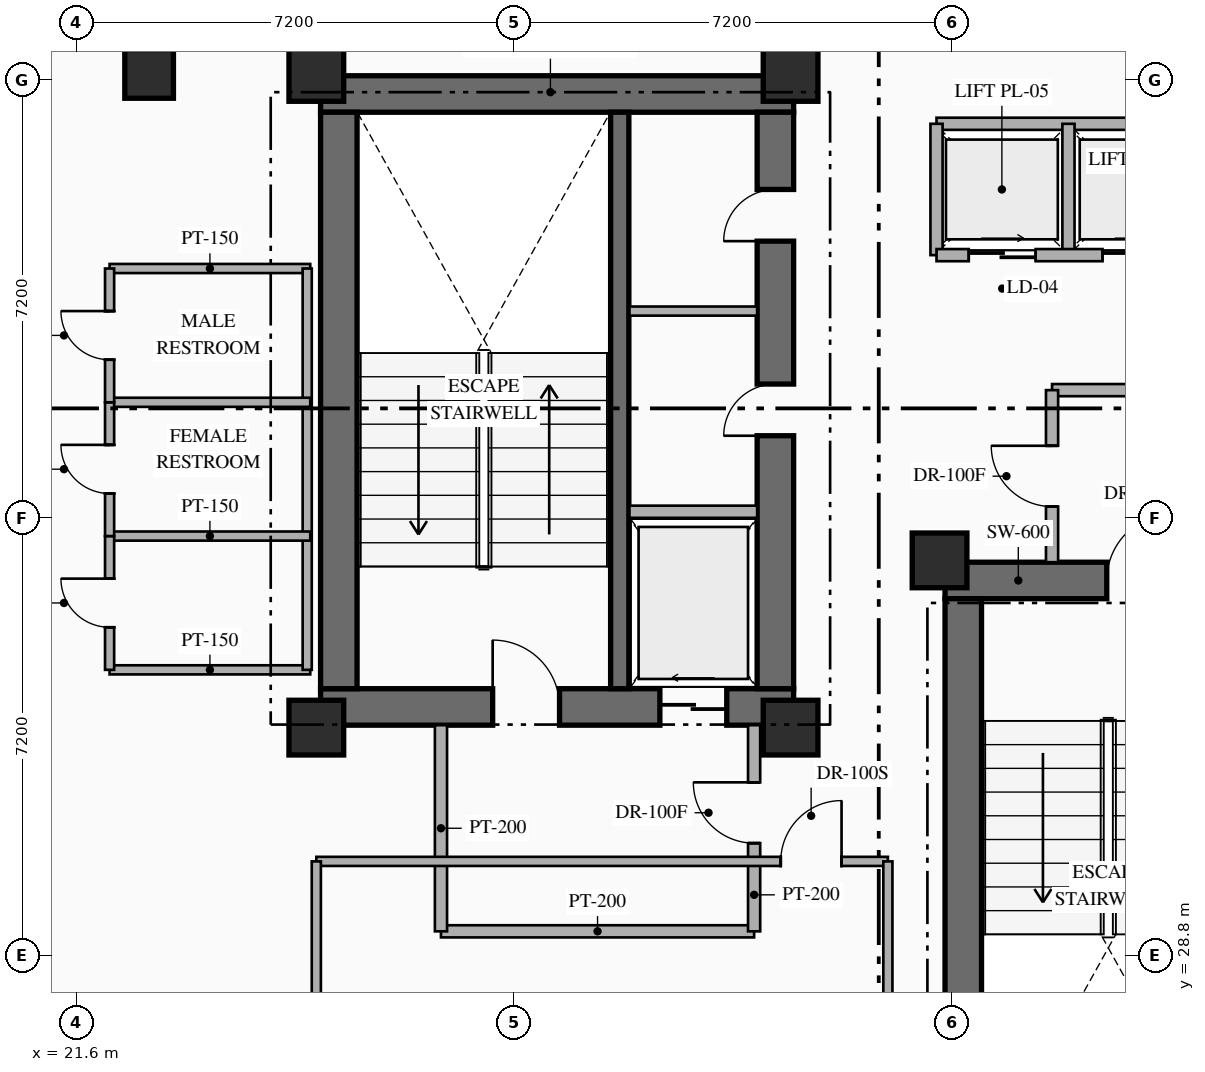
"""IFC4 building model, lengths in metres.
Left out: names, types, materials, properties, quantities, classifications, styles, units other than length and angle.
Written with IfcOpenShell. Run it as: python <this file> out.ifc"""

import sys

from ifc_helpers import new_model, si_unit, direction, frame, frame_2d, origin, origin_2d, place, context, subcontext, project, spatial, rectangle, hollow_rectangle, extrude, element, fill, save


model = new_model("IFC4")
c1 = context("Model", 3, precision=1e-05, world=origin(), true_north=direction((0.0, 1.0)))
c2 = subcontext(c1, "Body", "Model", "MODEL_VIEW")
j1 = project(units=[si_unit("LENGTHUNIT", "METRE"), si_unit("PLANEANGLEUNIT", "RADIAN")], contexts=[c1])
p1 = place(None, origin())
s1 = spatial("IfcSite", under=j1, at=p1, CompositionType="ELEMENT")
p2 = place(p1, origin())
s2 = spatial("IfcBuilding", under=s1, at=p2, CompositionType="ELEMENT")
p3 = place(p2, frame((0.0, 0.0, 134.85)))
s3 = spatial("IfcBuildingStorey", under=s2, at=p3, CompositionType="ELEMENT", Elevation=134.85)
p4 = place(p3, frame((25.62, 32.89, 0.0), z_axis=(0.0, 0.0, 1.0), x_axis=(1.0, 0.0, 0.0)))
e1 = element("IfcWall", 1, at=p4, inside=s3, PredefinedType="SHEAR", context=c2, shape_type="SweptSolid", body=[
    extrude(rectangle(XDim=7.78, YDim=0.6, at=frame_2d((3.89, 0.0))), origin(), (0.0, 0.0, 1.0), 3.6),
])
p5 = place(p4, frame((2.83, 0.0, 0.0)))
e2 = element("IfcOpeningElement", 2, at=p5, cuts=e1, PredefinedType="OPENING", context=c2, shape_type="SweptSolid", body=[
    extrude(rectangle(XDim=1.1, YDim=2.2, at=frame_2d((0.55, 1.1))), frame((0.0, 0.31, 0.0), z_axis=(0.0, -1.0, 0.0), x_axis=(1.0, 0.0, 0.0)), (0.0, 0.0, 1.0), 0.62),
])
p6 = place(p4, frame((5.58, 0.0, 0.0)))
e3 = element("IfcOpeningElement", 3, at=p6, cuts=e1, PredefinedType="OPENING", context=c2, shape_type="SweptSolid", body=[
    extrude(rectangle(XDim=1.1, YDim=2.15, at=frame_2d((0.55, 1.075))), frame((0.0, 0.31, 0.0), z_axis=(0.0, -1.0, 0.0), x_axis=(1.0, 0.0, 0.0)), (0.0, 0.0, 1.0), 0.62),
])
p7 = place(p3, frame((25.62, 42.97, 0.0), z_axis=(0.0, 0.0, 1.0), x_axis=(1.0, 0.0, 0.0)))
e4 = element("IfcWall", 4, at=p7, inside=s3, PredefinedType="SHEAR", context=c2, shape_type="SweptSolid", body=[
    extrude(rectangle(XDim=7.78, YDim=0.6, at=frame_2d((3.89, 0.0))), origin(), (0.0, 0.0, 1.0), 3.6),
])
p8 = place(p3, frame((25.92, 33.19, 0.0), z_axis=(0.0, 0.0, 1.0), x_axis=(0.0, 1.0, 0.0)))
e5 = element("IfcWall", 5, at=p8, inside=s3, PredefinedType="SHEAR", context=c2, shape_type="SweptSolid", body=[
    extrude(rectangle(XDim=9.48, YDim=0.6, at=frame_2d((4.74, 0.0))), origin(), (0.0, 0.0, 1.0), 3.6),
])
p9 = place(p3, frame((33.1, 33.19, 0.0), z_axis=(0.0, 0.0, 1.0), x_axis=(0.0, 1.0, 0.0)))
e6 = element("IfcWall", 6, at=p9, inside=s3, PredefinedType="SHEAR", context=c2, shape_type="SweptSolid", body=[
    extrude(rectangle(XDim=9.48, YDim=0.6, at=frame_2d((4.74, 0.0))), origin(), (0.0, 0.0, 1.0), 3.6),
])
p10 = place(p9, frame((4.16, 0.0, 0.0)))
e7 = element("IfcOpeningElement", 7, at=p10, cuts=e6, PredefinedType="OPENING", context=c2, shape_type="SweptSolid", body=[
    extrude(rectangle(XDim=0.85, YDim=2.08, at=frame_2d((0.425, 1.04))), frame((0.0, 0.31, 0.0), z_axis=(0.0, -1.0, 0.0), x_axis=(1.0, 0.0, 0.0)), (0.0, 0.0, 1.0), 0.62),
])
p11 = place(p9, frame((7.36, 0.0, 0.0)))
e8 = element("IfcOpeningElement", 8, at=p11, cuts=e6, PredefinedType="OPENING", context=c2, shape_type="SweptSolid", body=[
    extrude(rectangle(XDim=0.85, YDim=2.08, at=frame_2d((0.425, 1.04))), frame((0.0, 0.31, 0.0), z_axis=(0.0, -1.0, 0.0), x_axis=(1.0, 0.0, 0.0)), (0.0, 0.0, 1.0), 0.62),
])
p12 = place(p3, frame((30.54, 33.19, 0.0), z_axis=(0.0, 0.0, 1.0), x_axis=(0.0, 1.0, 0.0)))
e9 = element("IfcWall", 9, at=p12, inside=s3, PredefinedType="SHEAR", context=c2, shape_type="SweptSolid", body=[
    extrude(rectangle(XDim=9.48, YDim=0.3, at=frame_2d((4.74, 0.0))), origin(), (0.0, 0.0, 1.0), 3.6),
])
p13 = place(p3, frame((35.89, 34.97, 0.0), z_axis=(0.0, 0.0, 1.0), x_axis=(1.0, 0.0, 0.0)))
e10 = element("IfcWall", 10, at=p13, inside=s3, PredefinedType="SHEAR", context=c2, shape_type="SweptSolid", body=[
    extrude(rectangle(XDim=7.76, YDim=0.6, at=frame_2d((3.88, 0.0))), origin(), (0.0, 0.0, 1.0), 3.6),
])
p14 = place(p13, frame((2.66, 0.0, 0.0)))
e11 = element("IfcOpeningElement", 11, at=p14, cuts=e10, PredefinedType="OPENING", context=c2, shape_type="SweptSolid", body=[
    extrude(rectangle(XDim=1.1, YDim=2.2, at=frame_2d((0.55, 1.1))), frame((0.0, 0.31, 0.0), z_axis=(0.0, -1.0, 0.0), x_axis=(1.0, 0.0, 0.0)), (0.0, 0.0, 1.0), 0.62),
])
p15 = place(p13, frame((5.56, 0.0, 0.0)))
e12 = element("IfcOpeningElement", 12, at=p15, cuts=e10, PredefinedType="OPENING", context=c2, shape_type="SweptSolid", body=[
    extrude(rectangle(XDim=1.12, YDim=2.15, at=frame_2d((0.56, 1.075))), frame((0.0, 0.31, 0.0), z_axis=(0.0, -1.0, 0.0), x_axis=(1.0, 0.0, 0.0)), (0.0, 0.0, 1.0), 0.62),
])
p16 = place(p3, frame((36.19, 25.19, 0.0), z_axis=(0.0, 0.0, 1.0), x_axis=(0.0, 1.0, 0.0)))
e13 = element("IfcWall", 13, at=p16, inside=s3, PredefinedType="SHEAR", context=c2, shape_type="SweptSolid", body=[
    extrude(rectangle(XDim=9.48, YDim=0.6, at=frame_2d((4.74, 0.0))), origin(), (0.0, 0.0, 1.0), 3.6),
])
for number, where, z_axis, x_axis in (
    (14, (25.55, 32.55, 0.0), (0.0, 0.0, 1.0), (1.0, 0.0, 0.0)),
    (15, (33.35, 32.55, 0.0), (0.0, 0.0, 1.0), (1.0, 0.0, 0.0)),
    (16, (25.55, 43.3, 0.0), (0.0, 0.0, 1.0), (1.0, 0.0, 0.0)),
    (17, (33.35, 43.3, 0.0), (0.0, 0.0, 1.0), (1.0, 0.0, 0.0)),
    (18, (35.8, 35.3, 0.0), (0.0, 0.0, 1.0), (1.0, 0.0, 0.0)),
):
    element("IfcColumn", number, at=place(p3, frame(where, z_axis=z_axis, x_axis=x_axis)), inside=s3, PredefinedType="COLUMN", context=c2, shape_type="SweptSolid", body=[
        extrude(rectangle(XDim=0.9, YDim=0.9, at=origin_2d()), origin(), (0.0, 0.0, 1.0), 3.6),
    ])
p17 = place(p3, frame((22.8, 43.3, 0.0), z_axis=(0.0, 0.0, 1.0), x_axis=(1.0, 0.0, 0.0)))
e19 = element("IfcColumn", 19, at=p17, inside=s3, PredefinedType="COLUMN", context=c2, shape_type="SweptSolid", body=[
    extrude(hollow_rectangle(XDim=0.8, YDim=0.8, WallThickness=0.032, at=origin_2d()), origin(), (0.0, 0.0, 1.0), 3.6),
])
p18 = place(p3, frame((30.7, 36.1, 0.0), z_axis=(0.0, 0.0, 1.0), x_axis=(1.0, 0.0, 0.0)))
e20 = element("IfcWall", 20, at=p18, inside=s3, PredefinedType="STANDARD", context=c2, shape_type="SweptSolid", body=[
    extrude(rectangle(XDim=2.1, YDim=0.2, at=frame_2d((1.05, 0.0))), origin(), (0.0, 0.0, 1.0), 3.35),
])
p19 = place(p3, frame((30.7, 39.4, 0.0), z_axis=(0.0, 0.0, 1.0), x_axis=(1.0, 0.0, 0.0)))
e21 = element("IfcWall", 21, at=p19, inside=s3, PredefinedType="PARTITIONING", context=c2, shape_type="SweptSolid", body=[
    extrude(rectangle(XDim=2.1, YDim=0.15, at=frame_2d((1.05, 0.0))), origin(), (0.0, 0.0, 1.0), 3.35),
])
p20 = place(p3, frame((27.6, 29.2, 0.0), z_axis=(0.0, 0.0, 1.0), x_axis=(1.0, 0.0, 0.0)))
e22 = element("IfcWall", 22, at=p20, inside=s3, PredefinedType="STANDARD", context=c2, shape_type="SweptSolid", body=[
    extrude(rectangle(XDim=5.15, YDim=0.2, at=frame_2d((2.575, 0.0))), origin(), (0.0, 0.0, 1.0), 3.35),
])
p21 = place(p3, frame((27.6, 29.2, 0.0), z_axis=(0.0, 0.0, 1.0), x_axis=(0.0, 1.0, 0.0)))
e23 = element("IfcWall", 23, at=p21, inside=s3, PredefinedType="STANDARD", context=c2, shape_type="SweptSolid", body=[
    extrude(rectangle(XDim=3.39, YDim=0.2, at=frame_2d((1.695, 0.0))), origin(), (0.0, 0.0, 1.0), 3.35),
])
p22 = place(p3, frame((32.75, 29.2, 0.0), z_axis=(0.0, 0.0, 1.0), x_axis=(0.0, 1.0, 0.0)))
e24 = element("IfcWall", 24, at=p22, inside=s3, PredefinedType="STANDARD", context=c2, shape_type="SweptSolid", body=[
    extrude(rectangle(XDim=3.39, YDim=0.2, at=frame_2d((1.695, 0.0))), origin(), (0.0, 0.0, 1.0), 3.35),
])
p23 = place(p22, frame((1.45, 0.0, 0.0)))
e25 = element("IfcOpeningElement", 25, at=p23, cuts=e24, PredefinedType="OPENING", context=c2, shape_type="SweptSolid", body=[
    extrude(rectangle(XDim=1.0, YDim=2.2, at=frame_2d((0.5, 1.1))), frame((0.0, 0.11, 0.0), z_axis=(0.0, -1.0, 0.0), x_axis=(1.0, 0.0, 0.0)), (0.0, 0.0, 1.0), 0.22),
])
p24 = place(p3, frame((37.65, 38.1, 0.0), z_axis=(0.0, 0.0, 1.0), x_axis=(1.0, 0.0, 0.0)))
e26 = element("IfcWall", 26, at=p24, inside=s3, PredefinedType="STANDARD", context=c2, shape_type="SweptSolid", body=[
    extrude(rectangle(XDim=5.3, YDim=0.2, at=frame_2d((2.65, 0.0))), origin(), (0.0, 0.0, 1.0), 3.35),
])
p25 = place(p3, frame((37.65, 35.27, 0.0), z_axis=(0.0, 0.0, 1.0), x_axis=(0.0, 1.0, 0.0)))
e27 = element("IfcWall", 27, at=p25, inside=s3, PredefinedType="STANDARD", context=c2, shape_type="SweptSolid", body=[
    extrude(rectangle(XDim=2.83, YDim=0.2, at=frame_2d((1.415, 0.0))), origin(), (0.0, 0.0, 1.0), 3.35),
])
p26 = place(p25, frame((0.915, 0.0, 0.0)))
e28 = element("IfcOpeningElement", 28, at=p26, cuts=e27, PredefinedType="OPENING", context=c2, shape_type="SweptSolid", body=[
    extrude(rectangle(XDim=1.0, YDim=2.2, at=frame_2d((0.5, 1.1))), frame((0.0, 0.11, 0.0), z_axis=(0.0, -1.0, 0.0), x_axis=(1.0, 0.0, 0.0)), (0.0, 0.0, 1.0), 0.22),
])
p27 = place(p3, frame((35.75, 42.48, 0.0), z_axis=(0.0, 0.0, 1.0), x_axis=(1.0, 0.0, 0.0)))
e29 = element("IfcWall", 29, at=p27, inside=s3, PredefinedType="STANDARD", context=c2, shape_type="SweptSolid", body=[
    extrude(rectangle(XDim=9.11, YDim=0.2, at=frame_2d((4.555, 0.0))), origin(), (0.0, 0.0, 1.0), 3.35),
])
for number, where, z_axis, x_axis in (
    (30, (35.75, 40.32, 0.0), (0.0, 0.0, 1.0), (0.0, 1.0, 0.0)),
    (31, (37.92, 40.32, 0.0), (0.0, 0.0, 1.0), (0.0, 1.0, 0.0)),
):
    element("IfcWall", number, at=place(p3, frame(where, z_axis=z_axis, x_axis=x_axis)), inside=s3, PredefinedType="STANDARD", context=c2, shape_type="SweptSolid", body=[
        extrude(rectangle(XDim=2.16, YDim=0.2, at=frame_2d((1.08, 0.0))), origin(), (0.0, 0.0, 1.0), 3.35),
    ])
p28 = place(p3, frame((35.75, 40.32, 0.0), z_axis=(0.0, 0.0, 1.0), x_axis=(1.0, 0.0, 0.0)))
e32 = element("IfcWall", 32, at=p28, inside=s3, PredefinedType="STANDARD", context=c2, shape_type="SweptSolid", body=[
    extrude(rectangle(XDim=9.11, YDim=0.2, at=frame_2d((4.555, 0.0))), origin(), (0.0, 0.0, 1.0), 3.35),
])
p29 = place(p28, frame((0.53, 0.0, 0.0)))
e33 = element("IfcOpeningElement", 33, at=p29, cuts=e32, PredefinedType="OPENING", context=c2, shape_type="SweptSolid", body=[
    extrude(rectangle(XDim=1.1, YDim=2.18, at=frame_2d((0.55, 1.09))), frame((0.0, 0.11, 0.0), z_axis=(0.0, -1.0, 0.0), x_axis=(1.0, 0.0, 0.0)), (0.0, 0.0, 1.0), 0.22),
])
p30 = place(p28, frame((2.73, 0.0, 0.0)))
e34 = element("IfcOpeningElement", 34, at=p30, cuts=e32, PredefinedType="OPENING", context=c2, shape_type="SweptSolid", body=[
    extrude(rectangle(XDim=1.1, YDim=2.18, at=frame_2d((0.55, 1.09))), frame((0.0, 0.11, 0.0), z_axis=(0.0, -1.0, 0.0), x_axis=(1.0, 0.0, 0.0)), (0.0, 0.0, 1.0), 0.22),
])
p31 = place(p28, frame((4.93, 0.0, 0.0)))
e35 = element("IfcOpeningElement", 35, at=p31, cuts=e32, PredefinedType="OPENING", context=c2, shape_type="SweptSolid", body=[
    extrude(rectangle(XDim=1.1, YDim=2.18, at=frame_2d((0.55, 1.09))), frame((0.0, 0.11, 0.0), z_axis=(0.0, -1.0, 0.0), x_axis=(1.0, 0.0, 0.0)), (0.0, 0.0, 1.0), 0.22),
])
p32 = place(p28, frame((7.13, 0.0, 0.0)))
e36 = element("IfcOpeningElement", 36, at=p32, cuts=e32, PredefinedType="OPENING", context=c2, shape_type="SweptSolid", body=[
    extrude(rectangle(XDim=1.1, YDim=2.18, at=frame_2d((0.55, 1.09))), frame((0.0, 0.11, 0.0), z_axis=(0.0, -1.0, 0.0), x_axis=(1.0, 0.0, 0.0)), (0.0, 0.0, 1.0), 0.22),
])
for number, where, z_axis, x_axis in (
    (37, (22.15, 33.5, 0.0), (0.0, 0.0, 1.0), (1.0, 0.0, 0.0)),
    (38, (22.15, 40.1, 0.0), (0.0, 0.0, 1.0), (1.0, 0.0, 0.0)),
):
    element("IfcWall", number, at=place(p3, frame(where, z_axis=z_axis, x_axis=x_axis)), inside=s3, PredefinedType="PARTITIONING", context=c2, shape_type="SweptSolid", body=[
        extrude(rectangle(XDim=3.3, YDim=0.15, at=frame_2d((1.65, 0.0))), origin(), (0.0, 0.0, 1.0), 3.35),
    ])
p33 = place(p3, frame((25.4, 33.5, 0.0), z_axis=(0.0, 0.0, 1.0), x_axis=(0.0, 1.0, 0.0)))
e39 = element("IfcWall", 39, at=p33, inside=s3, PredefinedType="PARTITIONING", context=c2, shape_type="SweptSolid", body=[
    extrude(rectangle(XDim=6.6, YDim=0.15, at=frame_2d((3.3, 0.0))), origin(), (0.0, 0.0, 1.0), 3.35),
])
for number, where, z_axis, x_axis in (
    (40, (22.15, 35.7, 0.0), (0.0, 0.0, 1.0), (1.0, 0.0, 0.0)),
    (41, (22.15, 37.9, 0.0), (0.0, 0.0, 1.0), (1.0, 0.0, 0.0)),
):
    element("IfcWall", number, at=place(p3, frame(where, z_axis=z_axis, x_axis=x_axis)), inside=s3, PredefinedType="PARTITIONING", context=c2, shape_type="SweptSolid", body=[
        extrude(rectangle(XDim=3.3, YDim=0.15, at=frame_2d((1.65, 0.0))), origin(), (0.0, 0.0, 1.0), 3.35),
    ])
p34 = place(p3, frame((22.15, 33.5, 0.0), z_axis=(0.0, 0.0, 1.0), x_axis=(0.0, 1.0, 0.0)))
e42 = element("IfcWall", 42, at=p34, inside=s3, PredefinedType="PARTITIONING", context=c2, shape_type="SweptSolid", body=[
    extrude(rectangle(XDim=2.2, YDim=0.15, at=frame_2d((1.1, 0.0))), origin(), (0.0, 0.0, 1.0), 3.35),
])
p35 = place(p34, frame((0.7, 0.0, 0.0)))
e43 = element("IfcOpeningElement", 43, at=p35, cuts=e42, PredefinedType="OPENING", context=c2, shape_type="SweptSolid", body=[
    extrude(rectangle(XDim=0.8, YDim=2.06, at=frame_2d((0.4, 1.03))), frame((0.0, 0.085, 0.0), z_axis=(0.0, -1.0, 0.0), x_axis=(1.0, 0.0, 0.0)), (0.0, 0.0, 1.0), 0.17),
])
p36 = place(p3, frame((22.15, 35.7, 0.0), z_axis=(0.0, 0.0, 1.0), x_axis=(0.0, 1.0, 0.0)))
e44 = element("IfcWall", 44, at=p36, inside=s3, PredefinedType="PARTITIONING", context=c2, shape_type="SweptSolid", body=[
    extrude(rectangle(XDim=2.2, YDim=0.15, at=frame_2d((1.1, 0.0))), origin(), (0.0, 0.0, 1.0), 3.35),
])
p37 = place(p36, frame((0.7, 0.0, 0.0)))
e45 = element("IfcOpeningElement", 45, at=p37, cuts=e44, PredefinedType="OPENING", context=c2, shape_type="SweptSolid", body=[
    extrude(rectangle(XDim=0.8, YDim=2.06, at=frame_2d((0.4, 1.03))), frame((0.0, 0.085, 0.0), z_axis=(0.0, -1.0, 0.0), x_axis=(1.0, 0.0, 0.0)), (0.0, 0.0, 1.0), 0.17),
])
p38 = place(p3, frame((22.15, 37.9, 0.0), z_axis=(0.0, 0.0, 1.0), x_axis=(0.0, 1.0, 0.0)))
e46 = element("IfcWall", 46, at=p38, inside=s3, PredefinedType="PARTITIONING", context=c2, shape_type="SweptSolid", body=[
    extrude(rectangle(XDim=2.2, YDim=0.15, at=frame_2d((1.1, 0.0))), origin(), (0.0, 0.0, 1.0), 3.35),
])
p39 = place(p38, frame((0.7, 0.0, 0.0)))
e47 = element("IfcOpeningElement", 47, at=p39, cuts=e46, PredefinedType="OPENING", context=c2, shape_type="SweptSolid", body=[
    extrude(rectangle(XDim=0.8, YDim=2.06, at=frame_2d((0.4, 1.03))), frame((0.0, 0.085, 0.0), z_axis=(0.0, -1.0, 0.0), x_axis=(1.0, 0.0, 0.0)), (0.0, 0.0, 1.0), 0.17),
])
p40 = place(p3, frame((25.55, 30.35, 0.0), z_axis=(0.0, 0.0, 1.0), x_axis=(1.0, 0.0, 0.0)))
e48 = element("IfcWall", 48, at=p40, inside=s3, PredefinedType="PARTITIONING", context=c2, shape_type="SweptSolid", body=[
    extrude(rectangle(XDim=9.4, YDim=0.15, at=frame_2d((4.7, 0.0))), origin(), (0.0, 0.0, 1.0), 3.35),
])
p41 = place(p40, frame((7.638, 0.0, 0.0)))
e49 = element("IfcOpeningElement", 49, at=p41, cuts=e48, PredefinedType="OPENING", context=c2, shape_type="SweptSolid", body=[
    extrude(rectangle(XDim=1.0, YDim=2.15, at=frame_2d((0.5, 1.075))), frame((0.0, 0.085, 0.0), z_axis=(0.0, -1.0, 0.0), x_axis=(1.0, 0.0, 0.0)), (0.0, 0.0, 1.0), 0.17),
])
p42 = place(p3, frame((25.55, 23.2, 0.0), z_axis=(0.0, 0.0, 1.0), x_axis=(0.0, 1.0, 0.0)))
e50 = element("IfcWall", 50, at=p42, inside=s3, PredefinedType="PARTITIONING", context=c2, shape_type="SweptSolid", body=[
    extrude(rectangle(XDim=7.15, YDim=0.15, at=frame_2d((3.575, 0.0))), origin(), (0.0, 0.0, 1.0), 2.695),
])
p43 = place(p3, frame((34.95, 23.2, 0.0), z_axis=(0.0, 0.0, 1.0), x_axis=(0.0, 1.0, 0.0)))
e51 = element("IfcWall", 51, at=p43, inside=s3, PredefinedType="PARTITIONING", context=c2, shape_type="SweptSolid", body=[
    extrude(rectangle(XDim=7.15, YDim=0.15, at=frame_2d((3.575, 0.0))), origin(), (0.0, 0.0, 1.0), 3.35),
])
p44 = place(p5, origin())
e52 = element("IfcDoor", 52, at=p44, inside=s3, OperationType="SINGLE_SWING_LEFT", PredefinedType="DOOR", context=c2, shape_type="SweptSolid", body=[
    extrude(rectangle(XDim=1.1, YDim=2.2, at=frame_2d((0.55, 1.1))), frame((0.0, 0.025, 0.0), z_axis=(0.0, -1.0, 0.0), x_axis=(1.0, 0.0, 0.0)), (0.0, 0.0, 1.0), 0.05),
])
fill(e2, e52)
p45 = place(p6, origin())
e53 = element("IfcDoor", 53, at=p45, inside=s3, OperationType="SLIDING_TO_LEFT", PredefinedType="USERDEFINED", context=c2, shape_type="SweptSolid", body=[
    extrude(rectangle(XDim=1.1, YDim=2.15, at=frame_2d((0.55, 1.075))), frame((0.0, 0.025, 0.0), z_axis=(0.0, -1.0, 0.0), x_axis=(1.0, 0.0, 0.0)), (0.0, 0.0, 1.0), 0.05),
])
fill(e3, e53)
p46 = place(p14, origin())
e54 = element("IfcDoor", 54, at=p46, inside=s3, OperationType="SINGLE_SWING_RIGHT", PredefinedType="DOOR", context=c2, shape_type="SweptSolid", body=[
    extrude(rectangle(XDim=1.1, YDim=2.2, at=frame_2d((0.55, 1.1))), frame((0.0, 0.025, 0.0), z_axis=(0.0, -1.0, 0.0), x_axis=(1.0, 0.0, 0.0)), (0.0, 0.0, 1.0), 0.05),
])
fill(e11, e54)
p47 = place(p10, origin())
e55 = element("IfcDoor", 55, at=p47, inside=s3, OperationType="SINGLE_SWING_LEFT", PredefinedType="DOOR", context=c2, shape_type="SweptSolid", body=[
    extrude(rectangle(XDim=0.85, YDim=2.08, at=frame_2d((0.425, 1.04))), frame((0.0, 0.025, 0.0), z_axis=(0.0, -1.0, 0.0), x_axis=(1.0, 0.0, 0.0)), (0.0, 0.0, 1.0), 0.05),
])
fill(e7, e55)
p48 = place(p11, origin())
e56 = element("IfcDoor", 56, at=p48, inside=s3, OperationType="SINGLE_SWING_LEFT", PredefinedType="DOOR", context=c2, shape_type="SweptSolid", body=[
    extrude(rectangle(XDim=0.85, YDim=2.08, at=frame_2d((0.425, 1.04))), frame((0.0, 0.025, 0.0), z_axis=(0.0, -1.0, 0.0), x_axis=(1.0, 0.0, 0.0)), (0.0, 0.0, 1.0), 0.05),
])
fill(e8, e56)
p49 = place(p23, origin())
e57 = element("IfcDoor", 57, at=p49, inside=s3, OperationType="SINGLE_SWING_RIGHT", PredefinedType="DOOR", context=c2, shape_type="SweptSolid", body=[
    extrude(rectangle(XDim=1.0, YDim=2.2, at=frame_2d((0.5, 1.1))), frame((0.0, 0.025, 0.0), z_axis=(0.0, -1.0, 0.0), x_axis=(1.0, 0.0, 0.0)), (0.0, 0.0, 1.0), 0.05),
])
fill(e25, e57)
p50 = place(p26, origin())
e58 = element("IfcDoor", 58, at=p50, inside=s3, OperationType="SINGLE_SWING_RIGHT", PredefinedType="DOOR", context=c2, shape_type="SweptSolid", body=[
    extrude(rectangle(XDim=1.0, YDim=2.2, at=frame_2d((0.5, 1.1))), frame((0.0, 0.025, 0.0), z_axis=(0.0, -1.0, 0.0), x_axis=(1.0, 0.0, 0.0)), (0.0, 0.0, 1.0), 0.05),
])
fill(e28, e58)
p51 = place(p29, origin())
e59 = element("IfcDoor", 59, at=p51, inside=s3, OperationType="SLIDING_TO_RIGHT", PredefinedType="USERDEFINED", context=c2, shape_type="SweptSolid", body=[
    extrude(rectangle(XDim=1.1, YDim=2.18, at=frame_2d((0.55, 1.09))), frame((0.0, 0.025, 0.0), z_axis=(0.0, -1.0, 0.0), x_axis=(1.0, 0.0, 0.0)), (0.0, 0.0, 1.0), 0.05),
])
fill(e33, e59)
p52 = place(p30, origin())
e60 = element("IfcDoor", 60, at=p52, inside=s3, OperationType="SLIDING_TO_RIGHT", PredefinedType="USERDEFINED", context=c2, shape_type="SweptSolid", body=[
    extrude(rectangle(XDim=1.1, YDim=2.18, at=frame_2d((0.55, 1.09))), frame((0.0, 0.025, 0.0), z_axis=(0.0, -1.0, 0.0), x_axis=(1.0, 0.0, 0.0)), (0.0, 0.0, 1.0), 0.05),
])
fill(e34, e60)
p53 = place(p35, origin())
e61 = element("IfcDoor", 61, at=p53, inside=s3, OperationType="SINGLE_SWING_RIGHT", PredefinedType="DOOR", context=c2, shape_type="SweptSolid", body=[
    extrude(rectangle(XDim=0.8, YDim=2.06, at=frame_2d((0.4, 1.03))), frame((0.0, 0.025, 0.0), z_axis=(0.0, -1.0, 0.0), x_axis=(1.0, 0.0, 0.0)), (0.0, 0.0, 1.0), 0.05),
])
fill(e43, e61)
p54 = place(p37, origin())
e62 = element("IfcDoor", 62, at=p54, inside=s3, OperationType="SINGLE_SWING_RIGHT", PredefinedType="DOOR", context=c2, shape_type="SweptSolid", body=[
    extrude(rectangle(XDim=0.8, YDim=2.06, at=frame_2d((0.4, 1.03))), frame((0.0, 0.025, 0.0), z_axis=(0.0, -1.0, 0.0), x_axis=(1.0, 0.0, 0.0)), (0.0, 0.0, 1.0), 0.05),
])
fill(e45, e62)
p55 = place(p39, origin())
e63 = element("IfcDoor", 63, at=p55, inside=s3, OperationType="SINGLE_SWING_RIGHT", PredefinedType="DOOR", context=c2, shape_type="SweptSolid", body=[
    extrude(rectangle(XDim=0.8, YDim=2.06, at=frame_2d((0.4, 1.03))), frame((0.0, 0.025, 0.0), z_axis=(0.0, -1.0, 0.0), x_axis=(1.0, 0.0, 0.0)), (0.0, 0.0, 1.0), 0.05),
])
fill(e47, e63)
p56 = place(p41, origin())
e64 = element("IfcDoor", 64, at=p56, inside=s3, OperationType="SINGLE_SWING_RIGHT", PredefinedType="DOOR", context=c2, shape_type="SweptSolid", body=[
    extrude(rectangle(XDim=1.0, YDim=2.15, at=frame_2d((0.5, 1.075))), frame((0.0, 0.025, 0.0), z_axis=(0.0, -1.0, 0.0), x_axis=(1.0, 0.0, 0.0)), (0.0, 0.0, 1.0), 0.05),
])
fill(e49, e64)
save(model, sys.argv[1])
